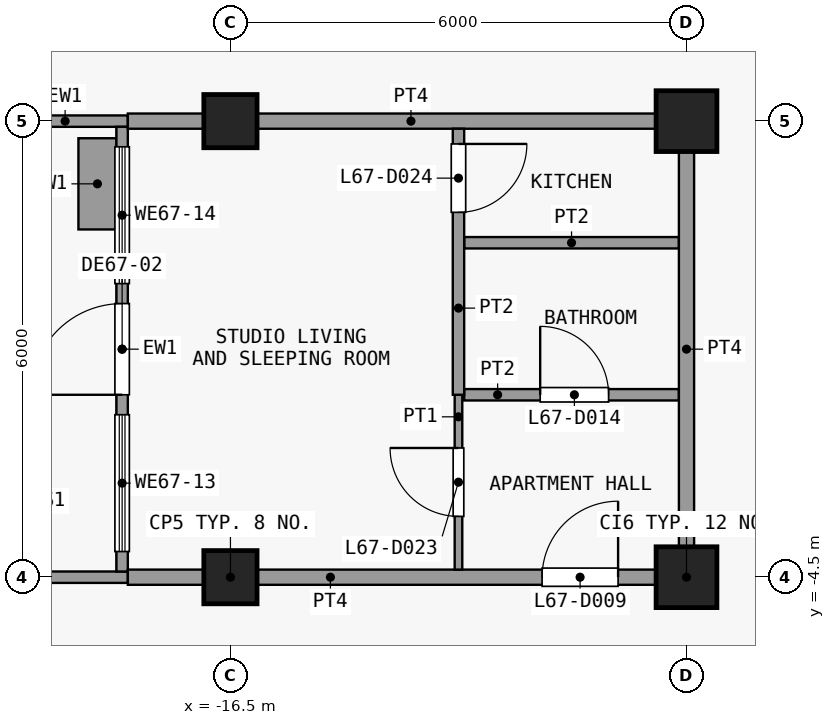
"""IFC4 building model, lengths in metres.
Left out: names, types, materials, properties, quantities, classifications, styles, units other than length and angle.
Written with IfcOpenShell. Run it as: python <this file> out.ifc"""

import sys

from ifc_helpers import new_model, si_unit, direction, frame, frame_2d, origin, origin_2d, place, context, subcontext, project, spatial, rectangle, extrude, element, fill, save


model = new_model("IFC4")
c1 = context("Model", 3, precision=1e-05, world=origin(), true_north=direction((0.0, 1.0)))
c2 = subcontext(c1, "Body", "Model", "MODEL_VIEW")
j1 = project(units=[si_unit("LENGTHUNIT", "METRE"), si_unit("PLANEANGLEUNIT", "RADIAN")], contexts=[c1])
p1 = place(None, origin())
s1 = spatial("IfcSite", under=j1, at=p1, CompositionType="ELEMENT")
p2 = place(p1, origin())
s2 = spatial("IfcBuilding", under=s1, at=p2, CompositionType="ELEMENT")
p3 = place(p2, frame((0.0, 0.0, 266.3)))
s3 = spatial("IfcBuildingStorey", under=s2, at=p3, CompositionType="ELEMENT", Elevation=266.3)
for number, where, z_axis, x_axis in (
    (1, (-16.5, -4.5, 0.0), (0.0, 0.0, 1.0), (1.0, 0.0, 0.0)),
    (2, (-16.5, 1.5, 0.0), (0.0, 0.0, 1.0), (1.0, 0.0, 0.0)),
):
    element("IfcColumn", number, at=place(p3, frame(where, z_axis=z_axis, x_axis=x_axis)), inside=s3, PredefinedType="COLUMN", context=c2, shape_type="SweptSolid", body=[
        extrude(rectangle(XDim=0.7, YDim=0.7, at=origin_2d()), origin(), (0.0, 0.0, 1.0), 3.6),
    ])
for number, where, z_axis, x_axis in (
    (3, (-10.5, -4.5, 0.0), (0.0, 0.0, 1.0), (1.0, 0.0, 0.0)),
    (4, (-10.5, 1.5, 0.0), (0.0, 0.0, 1.0), (1.0, 0.0, 0.0)),
):
    element("IfcColumn", number, at=place(p3, frame(where, z_axis=z_axis, x_axis=x_axis)), inside=s3, PredefinedType="COLUMN", context=c2, shape_type="SweptSolid", body=[
        extrude(rectangle(XDim=0.8, YDim=0.8, at=origin_2d()), origin(), (0.0, 0.0, 1.0), 3.6),
    ])
p4 = place(p3, frame((-17.85, -4.5, 0.0), z_axis=(0.0, 0.0, 1.0), x_axis=(-1.0, 0.0, 0.0)))
e5 = element("IfcWall", 5, at=p4, inside=s3, PredefinedType="SOLIDWALL", context=c2, shape_type="SweptSolid", body=[
    extrude(rectangle(XDim=2.55, YDim=0.15, at=frame_2d((1.275, 0.0))), origin(), (0.0, 0.0, 1.0), 3.3),
])
p5 = place(p3, frame((-17.85, 1.5, 0.0), z_axis=(0.0, 0.0, 1.0), x_axis=(-1.0, 0.0, 0.0)))
e6 = element("IfcWall", 6, at=p5, inside=s3, PredefinedType="SOLIDWALL", context=c2, shape_type="SweptSolid", body=[
    extrude(rectangle(XDim=1.65, YDim=0.15, at=frame_2d((0.825, 0.0))), origin(), (0.0, 0.0, 1.0), 3.3),
])
p6 = place(p3, frame((-17.925, -4.425, 0.0), z_axis=(0.0, 0.0, 1.0), x_axis=(0.0, 1.0, 0.0)))
e7 = element("IfcWall", 7, at=p6, inside=s3, PredefinedType="SOLIDWALL", context=c2, shape_type="SweptSolid", body=[
    extrude(rectangle(XDim=5.85, YDim=0.15, at=frame_2d((2.925, 0.0))), origin(), (0.0, 0.0, 1.0), 3.3),
])
p7 = place(p6, frame((2.325, 0.0, 0.0)))
e8 = element("IfcOpeningElement", 8, at=p7, cuts=e7, PredefinedType="OPENING", context=c2, shape_type="SweptSolid", body=[
    extrude(rectangle(XDim=1.2, YDim=2.4, at=frame_2d((0.6, 1.2))), frame((0.0, 0.085, 0.0), z_axis=(0.0, -1.0, 0.0), x_axis=(1.0, 0.0, 0.0)), (0.0, 0.0, 1.0), 0.17),
])
p8 = place(p6, frame((0.262, 0.0, 0.9)))
e9 = element("IfcOpeningElement", 9, at=p8, cuts=e7, PredefinedType="OPENING", context=c2, shape_type="SweptSolid", body=[
    extrude(rectangle(XDim=1.8, YDim=2.1, at=frame_2d((0.9, 1.05))), frame((0.0, 0.085, 0.0), z_axis=(0.0, -1.0, 0.0), x_axis=(1.0, 0.0, 0.0)), (0.0, 0.0, 1.0), 0.17),
])
p9 = place(p6, frame((3.788, 0.0, 0.9)))
e10 = element("IfcOpeningElement", 10, at=p9, cuts=e7, PredefinedType="OPENING", context=c2, shape_type="SweptSolid", body=[
    extrude(rectangle(XDim=1.8, YDim=2.1, at=frame_2d((0.9, 1.05))), frame((0.0, 0.085, 0.0), z_axis=(0.0, -1.0, 0.0), x_axis=(1.0, 0.0, 0.0)), (0.0, 0.0, 1.0), 0.17),
])
p10 = place(p3, frame((-18.25, 0.075, 0.0), z_axis=(0.0, 0.0, 1.0), x_axis=(0.0, 1.0, 0.0)))
e11 = element("IfcWall", 11, at=p10, inside=s3, PredefinedType="USERDEFINED", context=c2, shape_type="SweptSolid", body=[
    extrude(rectangle(XDim=1.2, YDim=0.5, at=frame_2d((0.6, 0.0))), origin(), (0.0, 0.0, 1.0), 0.9),
])
p11 = place(p3, frame((-17.85, -4.5, 0.0), z_axis=(0.0, 0.0, 1.0), x_axis=(1.0, 0.0, 0.0)))
e12 = element("IfcWall", 12, at=p11, inside=s3, PredefinedType="PARTITIONING", context=c2, shape_type="SweptSolid", body=[
    extrude(rectangle(XDim=7.45, YDim=0.2, at=frame_2d((3.725, 0.0))), origin(), (0.0, 0.0, 1.0), 3.3),
])
p12 = place(p11, frame((5.45, 0.0, 0.0)))
e13 = element("IfcOpeningElement", 13, at=p12, cuts=e12, PredefinedType="OPENING", context=c2, shape_type="SweptSolid", body=[
    extrude(rectangle(XDim=1.0, YDim=2.1, at=frame_2d((0.5, 1.05))), frame((0.0, 0.11, 0.0), z_axis=(0.0, -1.0, 0.0), x_axis=(1.0, 0.0, 0.0)), (0.0, 0.0, 1.0), 0.22),
])
p13 = place(p3, frame((-13.425, -2.1, 0.0), z_axis=(0.0, 0.0, 1.0), x_axis=(1.0, 0.0, 0.0)))
e14 = element("IfcWall", 14, at=p13, inside=s3, PredefinedType="PARTITIONING", context=c2, shape_type="SweptSolid", body=[
    extrude(rectangle(XDim=2.825, YDim=0.15, at=frame_2d((1.413, 0.0))), origin(), (0.0, 0.0, 1.0), 3.3),
])
p14 = place(p13, frame((1.0, 0.0, 0.0)))
e15 = element("IfcOpeningElement", 15, at=p14, cuts=e14, PredefinedType="OPENING", context=c2, shape_type="SweptSolid", body=[
    extrude(rectangle(XDim=0.9, YDim=2.1, at=frame_2d((0.45, 1.05))), frame((0.0, 0.085, 0.0), z_axis=(0.0, -1.0, 0.0), x_axis=(1.0, 0.0, 0.0)), (0.0, 0.0, 1.0), 0.17),
])
p15 = place(p3, frame((-13.425, -0.1, 0.0), z_axis=(0.0, 0.0, 1.0), x_axis=(1.0, 0.0, 0.0)))
e16 = element("IfcWall", 16, at=p15, inside=s3, PredefinedType="PARTITIONING", context=c2, shape_type="SweptSolid", body=[
    extrude(rectangle(XDim=2.825, YDim=0.15, at=frame_2d((1.413, 0.0))), origin(), (0.0, 0.0, 1.0), 3.3),
])
p16 = place(p3, frame((-17.85, 1.5, 0.0), z_axis=(0.0, 0.0, 1.0), x_axis=(1.0, 0.0, 0.0)))
e17 = element("IfcWall", 17, at=p16, inside=s3, PredefinedType="PARTITIONING", context=c2, shape_type="SweptSolid", body=[
    extrude(rectangle(XDim=7.45, YDim=0.2, at=frame_2d((3.725, 0.0))), origin(), (0.0, 0.0, 1.0), 3.3),
])
p17 = place(p3, frame((-13.5, -4.4, 0.0), z_axis=(0.0, 0.0, 1.0), x_axis=(0.0, 1.0, 0.0)))
e18 = element("IfcWall", 18, at=p17, inside=s3, PredefinedType="PARTITIONING", context=c2, shape_type="SweptSolid", body=[
    extrude(rectangle(XDim=2.3, YDim=0.1, at=frame_2d((1.15, 0.0))), origin(), (0.0, 0.0, 1.0), 3.3),
])
p18 = place(p17, frame((0.7, 0.0, 0.0)))
e19 = element("IfcOpeningElement", 19, at=p18, cuts=e18, PredefinedType="OPENING", context=c2, shape_type="SweptSolid", body=[
    extrude(rectangle(XDim=0.9, YDim=2.1, at=frame_2d((0.45, 1.05))), frame((0.0, 0.06, 0.0), z_axis=(0.0, -1.0, 0.0), x_axis=(1.0, 0.0, 0.0)), (0.0, 0.0, 1.0), 0.12),
])
p19 = place(p3, frame((-13.5, -2.1, 0.0), z_axis=(0.0, 0.0, 1.0), x_axis=(0.0, 1.0, 0.0)))
e20 = element("IfcWall", 20, at=p19, inside=s3, PredefinedType="PARTITIONING", context=c2, shape_type="SweptSolid", body=[
    extrude(rectangle(XDim=3.5, YDim=0.15, at=frame_2d((1.75, 0.0))), origin(), (0.0, 0.0, 1.0), 3.3),
])
p20 = place(p19, frame((2.4, 0.0, 0.0)))
e21 = element("IfcOpeningElement", 21, at=p20, cuts=e20, PredefinedType="OPENING", context=c2, shape_type="SweptSolid", body=[
    extrude(rectangle(XDim=0.9, YDim=2.1, at=frame_2d((0.45, 1.05))), frame((0.0, 0.085, 0.0), z_axis=(0.0, -1.0, 0.0), x_axis=(1.0, 0.0, 0.0)), (0.0, 0.0, 1.0), 0.17),
])
p21 = place(p3, frame((-10.5, -4.4, 0.0), z_axis=(0.0, 0.0, 1.0), x_axis=(0.0, 1.0, 0.0)))
e22 = element("IfcWall", 22, at=p21, inside=s3, PredefinedType="PARTITIONING", context=c2, shape_type="SweptSolid", body=[
    extrude(rectangle(XDim=5.8, YDim=0.2, at=frame_2d((2.9, 0.0))), origin(), (0.0, 0.0, 1.0), 3.3),
])
p22 = place(p7, origin())
e23 = element("IfcDoor", 23, at=p22, inside=s3, OperationType="SINGLE_SWING_LEFT", PredefinedType="DOOR", context=c2, shape_type="SweptSolid", body=[
    extrude(rectangle(XDim=1.2, YDim=2.4, at=frame_2d((0.6, 1.2))), frame((0.0, 0.025, 0.0), z_axis=(0.0, -1.0, 0.0), x_axis=(1.0, 0.0, 0.0)), (0.0, 0.0, 1.0), 0.05),
])
fill(e8, e23)
p23 = place(p8, origin())
e24 = element("IfcWindow", 24, at=p23, inside=s3, PartitioningType="SINGLE_PANEL", PredefinedType="WINDOW", context=c2, shape_type="SweptSolid", body=[
    extrude(rectangle(XDim=1.8, YDim=2.1, at=frame_2d((0.9, 1.05))), frame((0.0, 0.03, 0.0), z_axis=(0.0, -1.0, 0.0), x_axis=(1.0, 0.0, 0.0)), (0.0, 0.0, 1.0), 0.06),
])
fill(e9, e24)
p24 = place(p9, origin())
e25 = element("IfcWindow", 25, at=p24, inside=s3, PartitioningType="SINGLE_PANEL", PredefinedType="WINDOW", context=c2, shape_type="SweptSolid", body=[
    extrude(rectangle(XDim=1.8, YDim=2.1, at=frame_2d((0.9, 1.05))), frame((0.0, 0.03, 0.0), z_axis=(0.0, -1.0, 0.0), x_axis=(1.0, 0.0, 0.0)), (0.0, 0.0, 1.0), 0.06),
])
fill(e10, e25)
p25 = place(p12, origin())
e26 = element("IfcDoor", 26, at=p25, inside=s3, OperationType="SINGLE_SWING_LEFT", PredefinedType="DOOR", context=c2, shape_type="SweptSolid", body=[
    extrude(rectangle(XDim=1.0, YDim=2.1, at=frame_2d((0.5, 1.05))), frame((0.0, 0.025, 0.0), z_axis=(0.0, -1.0, 0.0), x_axis=(1.0, 0.0, 0.0)), (0.0, 0.0, 1.0), 0.05),
])
fill(e13, e26)
p26 = place(p14, origin())
e27 = element("IfcDoor", 27, at=p26, inside=s3, OperationType="SINGLE_SWING_RIGHT", PredefinedType="DOOR", context=c2, shape_type="SweptSolid", body=[
    extrude(rectangle(XDim=0.9, YDim=2.1, at=frame_2d((0.45, 1.05))), frame((0.0, 0.025, 0.0), z_axis=(0.0, -1.0, 0.0), x_axis=(1.0, 0.0, 0.0)), (0.0, 0.0, 1.0), 0.05),
])
fill(e15, e27)
p27 = place(p18, origin())
e28 = element("IfcDoor", 28, at=p27, inside=s3, OperationType="SINGLE_SWING_LEFT", PredefinedType="DOOR", context=c2, shape_type="SweptSolid", body=[
    extrude(rectangle(XDim=0.9, YDim=2.1, at=frame_2d((0.45, 1.05))), frame((0.0, 0.025, 0.0), z_axis=(0.0, -1.0, 0.0), x_axis=(1.0, 0.0, 0.0)), (0.0, 0.0, 1.0), 0.05),
])
fill(e19, e28)
p28 = place(p20, origin())
e29 = element("IfcDoor", 29, at=p28, inside=s3, OperationType="SINGLE_SWING_RIGHT", PredefinedType="DOOR", context=c2, shape_type="SweptSolid", body=[
    extrude(rectangle(XDim=0.9, YDim=2.1, at=frame_2d((0.45, 1.05))), frame((0.0, 0.025, 0.0), z_axis=(0.0, -1.0, 0.0), x_axis=(1.0, 0.0, 0.0)), (0.0, 0.0, 1.0), 0.05),
])
fill(e21, e29)
save(model, sys.argv[1])
